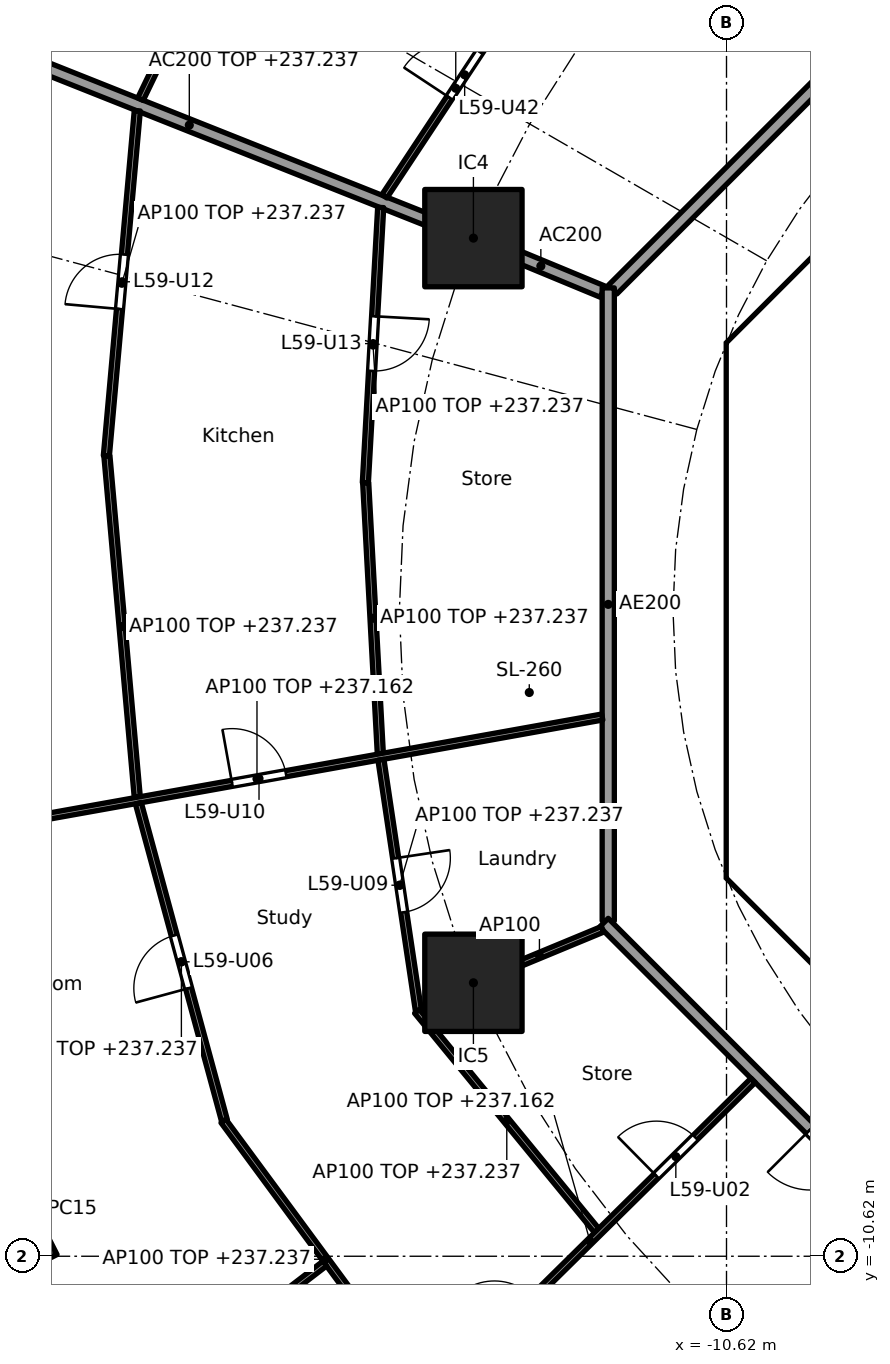
"""IFC4 building model, lengths in metres.
Left out: names, types, materials, properties, quantities, classifications, styles, units other than length and angle.
Written with IfcOpenShell. Run it as: python <this file> out.ifc"""

import sys

from ifc_helpers import new_model, si_unit, direction, frame, frame_2d, origin, origin_2d, place, context, subcontext, project, spatial, polyline, rectangle, hollow_rectangle, outline, extrude, element, fill, save


model = new_model("IFC4")
c1 = context("Model", 3, precision=1e-05, world=origin(), true_north=direction((0.0, 1.0)))
c2 = subcontext(c1, "Body", "Model", "MODEL_VIEW")
j1 = project(units=[si_unit("LENGTHUNIT", "METRE"), si_unit("PLANEANGLEUNIT", "RADIAN")], contexts=[c1])
p1 = place(None, origin())
s1 = spatial("IfcSite", under=j1, at=p1, CompositionType="ELEMENT")
p2 = place(p1, origin())
s2 = spatial("IfcBuilding", under=s1, at=p2, CompositionType="ELEMENT")
p3 = place(p2, frame((0.0, 0.0, 234.4)))
s3 = spatial("IfcBuildingStorey", under=s2, at=p3, CompositionType="ELEMENT", Elevation=234.4)
p4 = place(p3, frame((-22.212, -10.327, 0.0), z_axis=(0.0, 0.0, 1.0), x_axis=(0.452462697578, -0.891783329795, 0.0)))
e1 = element("IfcColumn", 1, at=p4, inside=s3, PredefinedType="COLUMN", context=c2, shape_type="SweptSolid", body=[
    extrude(hollow_rectangle(XDim=1.0, YDim=0.8, WallThickness=0.032, at=origin_2d()), origin(), (0.0, 0.0, 1.0), 3.7),
])
for number, where, z_axis, x_axis in (
    (2, (-14.782, 6.123, 0.0), (0.0, 0.0, 1.0), (1.0, 0.0, 0.0)),
    (3, (-14.782, -6.123, 0.0), (0.0, 0.0, 1.0), (1.0, 0.0, 0.0)),
):
    element("IfcColumn", number, at=place(p3, frame(where, z_axis=z_axis, x_axis=x_axis)), inside=s3, PredefinedType="COLUMN", context=c2, shape_type="SweptSolid", body=[
        extrude(rectangle(XDim=1.6, YDim=1.6, at=origin_2d()), origin(), (0.0, 0.0, 1.0), 3.7),
    ])
p5 = place(p3, frame((-20.788, -13.493, 0.0), z_axis=(0.0, 0.0, 1.0), x_axis=(-0.506294090973, 0.862360883532, 0.0)))
e4 = element("IfcWall", 4, at=p5, inside=s3, PredefinedType="SOLIDWALL", context=c2, shape_type="SweptSolid", body=[
    extrude(rectangle(XDim=2.955, YDim=0.25, at=frame_2d((1.477, 0.0))), origin(), (0.0, 0.0, 1.0), 3.44),
])
p6 = place(p5, frame((0.427, 0.0, 0.0)))
e5 = element("IfcOpeningElement", 5, at=p6, cuts=e4, PredefinedType="OPENING", context=c2, shape_type="SweptSolid", body=[
    extrude(rectangle(XDim=2.1, YDim=2.4, at=frame_2d((1.05, 1.2))), frame((0.0, 0.135, 0.0), z_axis=(0.0, -1.0, 0.0), x_axis=(1.0, 0.0, 0.0)), (0.0, 0.0, 1.0), 0.27),
])
p7 = place(p3, frame((-4.613, 9.988, 0.0), z_axis=(0.0, 0.0, 1.0), x_axis=(-0.707106781187, -0.707106781187, 0.0)))
e6 = element("IfcWall", 6, at=p7, inside=s3, PredefinedType="SHEAR", context=c2, shape_type="SweptSolid", body=[
    extrude(rectangle(XDim=7.602, YDim=0.6, at=frame_2d((3.801, 0.0))), origin(), (0.0, 0.0, 1.0), 3.44),
])
p8 = place(p7, frame((0.351, 0.0, 0.0)))
e7 = element("IfcOpeningElement", 7, at=p8, cuts=e6, PredefinedType="OPENING", context=c2, shape_type="SweptSolid", body=[
    extrude(rectangle(XDim=1.1, YDim=2.1, at=frame_2d((0.55, 1.05))), frame((0.0, 0.31, 0.0), z_axis=(0.0, -1.0, 0.0), x_axis=(1.0, 0.0, 0.0)), (0.0, 0.0, 1.0), 0.62),
])
p9 = place(p3, frame((-10.325, 3.801, 0.0), z_axis=(0.0, 0.0, 1.0), x_axis=(0.0, -1.0, 0.0)))
e8 = element("IfcWall", 8, at=p9, inside=s3, PredefinedType="SHEAR", context=c2, shape_type="SweptSolid", body=[
    extrude(rectangle(XDim=7.602, YDim=0.6, at=frame_2d((3.801, 0.0))), origin(), (0.0, 0.0, 1.0), 3.44),
])
p10 = place(p9, frame((0.651, 0.0, 0.0)))
e9 = element("IfcOpeningElement", 9, at=p10, cuts=e8, PredefinedType="OPENING", context=c2, shape_type="SweptSolid", body=[
    extrude(rectangle(XDim=1.5, YDim=2.1, at=frame_2d((0.75, 1.05))), frame((0.0, 0.31, 0.0), z_axis=(0.0, -1.0, 0.0), x_axis=(1.0, 0.0, 0.0)), (0.0, 0.0, 1.0), 0.62),
])
p11 = place(p9, frame((5.451, 0.0, 0.0)))
e10 = element("IfcOpeningElement", 10, at=p11, cuts=e8, PredefinedType="OPENING", context=c2, shape_type="SweptSolid", body=[
    extrude(rectangle(XDim=1.5, YDim=2.1, at=frame_2d((0.75, 1.05))), frame((0.0, 0.31, 0.0), z_axis=(0.0, -1.0, 0.0), x_axis=(1.0, 0.0, 0.0)), (0.0, 0.0, 1.0), 0.62),
])
p12 = place(p3, frame((-9.988, -4.613, 0.0), z_axis=(0.0, 0.0, 1.0), x_axis=(0.707106781187, -0.707106781187, 0.0)))
e11 = element("IfcWall", 11, at=p12, inside=s3, PredefinedType="SHEAR", context=c2, shape_type="SweptSolid", body=[
    extrude(rectangle(XDim=7.602, YDim=0.6, at=frame_2d((3.801, 0.0))), origin(), (0.0, 0.0, 1.0), 3.44),
])
p13 = place(p12, frame((6.151, 0.0, 0.0)))
e12 = element("IfcOpeningElement", 12, at=p13, cuts=e11, PredefinedType="OPENING", context=c2, shape_type="SweptSolid", body=[
    extrude(rectangle(XDim=1.1, YDim=2.1, at=frame_2d((0.55, 1.05))), frame((0.0, 0.31, 0.0), z_axis=(0.0, -1.0, 0.0), x_axis=(1.0, 0.0, 0.0)), (0.0, 0.0, 1.0), 0.62),
])
p14 = place(p3, origin())
e13 = element("IfcWall", 13, at=p14, inside=s3, PredefinedType="SHEAR", context=c2, shape_type="SweptSolid", body=[
    extrude(outline(polyline([(-10.625, -3.801), (-10.025, -3.801), (-10.025, -4.152), (-9.776, -4.401), (-10.2, -4.825), (-10.625, -4.401), (-10.625, -3.801)])), origin(), (0.0, 0.0, 1.0), 3.44),
])
p15 = place(p3, origin())
e14 = element("IfcWall", 14, at=p15, inside=s3, PredefinedType="SHEAR", context=c2, shape_type="SweptSolid", body=[
    extrude(outline(polyline([(-10.2, 4.825), (-9.776, 4.401), (-10.025, 4.152), (-10.025, 3.801), (-10.625, 3.801), (-10.625, 4.401), (-10.2, 4.825)])), origin(), (0.0, 0.0, 1.0), 3.44),
])
for number, where, z_axis, x_axis in (
    (15, (-10.025, -4.0, 0.0), (0.0, 0.0, 1.0), (1.0, 0.0, 0.0)),
    (16, (-10.025, 4.0, 0.0), (0.0, 0.0, 1.0), (1.0, 0.0, 0.0)),
):
    element("IfcWall", number, at=place(p3, frame(where, z_axis=z_axis, x_axis=x_axis)), inside=s3, PredefinedType="PARTITIONING", context=c2, shape_type="SweptSolid", body=[
        extrude(rectangle(XDim=3.325, YDim=0.2, at=frame_2d((1.662, 0.0))), origin(), (0.0, 0.0, 1.0), 3.44),
    ])
p16 = place(p3, frame((-12.657, 5.243, 0.0), z_axis=(0.0, 0.0, 1.0), x_axis=(-0.923859888513, 0.38273085373, 0.0)))
e17 = element("IfcWall", 17, at=p16, inside=s3, PredefinedType="PARTITIONING", context=c2, shape_type="SweptSolid", body=[
    extrude(rectangle(XDim=2.199, YDim=0.2, at=frame_2d((1.1, 0.0))), origin(), (0.0, 0.0, 1.0), 3.44),
])
p17 = place(p3, frame((-14.829, 6.141, 0.0), z_axis=(0.0, 0.0, 1.0), x_axis=(-0.929202069098, 0.36957206981, 0.0)))
e18 = element("IfcWall", 18, at=p17, inside=s3, PredefinedType="PARTITIONING", context=c2, shape_type="SweptSolid", body=[
    extrude(rectangle(XDim=9.957, YDim=0.2, at=frame_2d((4.978, 0.0))), origin(), (0.0, 0.0, 1.0), 2.837),
])
p18 = place(p3, frame((-5.275, 12.494, 0.0), z_axis=(0.0, 0.0, 1.0), x_axis=(-0.707106781187, -0.707106781187, 0.0)))
e19 = element("IfcWall", 19, at=p18, inside=s3, PredefinedType="PARTITIONING", context=c2, shape_type="SweptSolid", body=[
    extrude(rectangle(XDim=10.209, YDim=0.2, at=frame_2d((5.104, 0.0))), origin(), (0.0, 0.0, 1.0), 3.44),
])
p19 = place(p18, frame((1.185, 0.0, 0.0)))
e20 = element("IfcOpeningElement", 20, at=p19, cuts=e19, PredefinedType="OPENING", context=c2, shape_type="SweptSolid", body=[
    extrude(rectangle(XDim=1.0, YDim=2.1, at=frame_2d((0.5, 1.05))), frame((0.0, 0.11, 0.0), z_axis=(0.0, -1.0, 0.0), x_axis=(1.0, 0.0, 0.0)), (0.0, 0.0, 1.0), 0.22),
])
p20 = place(p3, frame((-12.565, 5.304, 0.0), z_axis=(0.0, 0.0, 1.0), x_axis=(0.0, -1.0, 0.0)))
e21 = element("IfcWall", 21, at=p20, inside=s3, PredefinedType="PARTITIONING", context=c2, shape_type="SweptSolid", body=[
    extrude(rectangle(XDim=10.409, YDim=0.2, at=frame_2d((5.205, 0.0))), origin(), (0.0, 0.0, 1.0), 3.44),
])
p21 = place(p3, frame((-12.635, -5.134, 0.0), z_axis=(0.0, 0.0, 1.0), x_axis=(0.707106781187, -0.707106781187, 0.0)))
e22 = element("IfcWall", 22, at=p21, inside=s3, PredefinedType="PARTITIONING", context=c2, shape_type="SweptSolid", body=[
    extrude(rectangle(XDim=10.609, YDim=0.2, at=frame_2d((5.305, 0.0))), origin(), (0.0, 0.0, 1.0), 3.44),
])
p22 = place(p21, frame((4.804, 0.0, 0.0)))
e23 = element("IfcOpeningElement", 23, at=p22, cuts=e22, PredefinedType="OPENING", context=c2, shape_type="SweptSolid", body=[
    extrude(rectangle(XDim=1.0, YDim=2.1, at=frame_2d((0.5, 1.05))), frame((0.0, 0.11, 0.0), z_axis=(0.0, -1.0, 0.0), x_axis=(1.0, 0.0, 0.0)), (0.0, 0.0, 1.0), 0.22),
])
p23 = place(p3, frame((-13.899, 10.363, 0.0), z_axis=(0.0, 0.0, 1.0), x_axis=(-0.551267958114, -0.834328255758, 0.0)))
e24 = element("IfcWall", 24, at=p23, inside=s3, PredefinedType="PARTITIONING", context=c2, shape_type="SweptSolid", body=[
    extrude(rectangle(XDim=4.257, YDim=0.1, at=frame_2d((2.129, 0.0))), origin(), (0.0, 0.0, 1.0), 2.837),
])
p24 = place(p23, frame((1.413, 0.0, 0.0)))
e25 = element("IfcOpeningElement", 25, at=p24, cuts=e24, PredefinedType="OPENING", context=c2, shape_type="SweptSolid", body=[
    extrude(rectangle(XDim=0.9, YDim=2.1, at=frame_2d((0.45, 1.05))), frame((0.0, 0.06, 0.0), z_axis=(0.0, -1.0, 0.0), x_axis=(1.0, 0.0, 0.0)), (0.0, 0.0, 1.0), 0.12),
])
p25 = place(p3, frame((-17.904, 13.289, 0.0), z_axis=(0.0, 0.0, 1.0), x_axis=(-0.43429918566, -0.900768681369, 0.0)))
e26 = element("IfcWall", 26, at=p25, inside=s3, PredefinedType="PARTITIONING", context=c2, shape_type="SweptSolid", body=[
    extrude(rectangle(XDim=5.418, YDim=0.1, at=frame_2d((2.709, 0.0))), origin(), (0.0, 0.0, 1.0), 2.837),
])
p26 = place(p3, frame((-16.307, 6.627, 0.0), z_axis=(0.0, 0.0, 1.0), x_axis=(-0.055616130958, -0.998452225185, 0.0)))
e27 = element("IfcWall", 27, at=p26, inside=s3, PredefinedType="PARTITIONING", context=c2, shape_type="SweptSolid", body=[
    extrude(rectangle(XDim=4.535, YDim=0.1, at=frame_2d((2.267, 0.0))), origin(), (0.0, 0.0, 1.0), 2.837),
])
p27 = place(p26, frame((1.792, 0.0, 0.0)))
e28 = element("IfcOpeningElement", 28, at=p27, cuts=e27, PredefinedType="OPENING", context=c2, shape_type="SweptSolid", body=[
    extrude(rectangle(XDim=0.9, YDim=2.1, at=frame_2d((0.45, 1.05))), frame((0.0, 0.06, 0.0), z_axis=(0.0, -1.0, 0.0), x_axis=(1.0, 0.0, 0.0)), (0.0, 0.0, 1.0), 0.12),
])
p28 = place(p3, frame((-20.31, 8.218, 0.0), z_axis=(0.0, 0.0, 1.0), x_axis=(-0.089284106956, -0.996006198899, 0.0)))
e29 = element("IfcWall", 29, at=p28, inside=s3, PredefinedType="PARTITIONING", context=c2, shape_type="SweptSolid", body=[
    extrude(rectangle(XDim=5.698, YDim=0.1, at=frame_2d((2.849, 0.0))), origin(), (0.0, 0.0, 1.0), 2.837),
])
p29 = place(p28, frame((2.374, 0.0, 0.0)))
e30 = element("IfcOpeningElement", 30, at=p29, cuts=e29, PredefinedType="OPENING", context=c2, shape_type="SweptSolid", body=[
    extrude(rectangle(XDim=0.9, YDim=2.1, at=frame_2d((0.45, 1.05))), frame((0.0, 0.06, 0.0), z_axis=(0.0, -1.0, 0.0), x_axis=(1.0, 0.0, 0.0)), (0.0, 0.0, 1.0), 0.12),
])
p30 = place(p3, frame((-16.554, 2.1, 0.0), z_axis=(0.0, 0.0, 1.0), x_axis=(0.053945770239, -0.998543866775, 0.0)))
e31 = element("IfcWall", 31, at=p30, inside=s3, PredefinedType="PARTITIONING", context=c2, shape_type="SweptSolid", body=[
    extrude(rectangle(XDim=4.462, YDim=0.1, at=frame_2d((2.231, 0.0))), origin(), (0.0, 0.0, 1.0), 2.837),
])
p31 = place(p3, frame((-20.81, 2.542, 0.0), z_axis=(0.0, 0.0, 1.0), x_axis=(0.088621920298, -0.996065336834, 0.0)))
e32 = element("IfcWall", 32, at=p31, inside=s3, PredefinedType="PARTITIONING", context=c2, shape_type="SweptSolid", body=[
    extrude(rectangle(XDim=5.636, YDim=0.1, at=frame_2d((2.818, 0.0))), origin(), (0.0, 0.0, 1.0), 2.837),
])
p32 = place(p3, frame((-12.663, -1.752, 0.0), z_axis=(0.0, 0.0, 1.0), x_axis=(-0.98433012022, -0.176335516635, 0.0)))
e33 = element("IfcWall", 33, at=p32, inside=s3, PredefinedType="PARTITIONING", context=c2, shape_type="SweptSolid", body=[
    extrude(rectangle(XDim=11.537, YDim=0.1, at=frame_2d((5.769, 0.0))), origin(), (0.0, 0.0, 1.0), 2.762),
])
p33 = place(p32, frame((5.285, 0.0, 0.0)))
e34 = element("IfcOpeningElement", 34, at=p33, cuts=e33, PredefinedType="OPENING", context=c2, shape_type="SweptSolid", body=[
    extrude(rectangle(XDim=0.9, YDim=2.1, at=frame_2d((0.45, 1.05))), frame((0.0, 0.06, 0.0), z_axis=(0.0, -1.0, 0.0), x_axis=(1.0, 0.0, 0.0)), (0.0, 0.0, 1.0), 0.12),
])
p34 = place(p3, frame((-16.303, -2.455, 0.0), z_axis=(0.0, 0.0, 1.0), x_axis=(0.14769374353, -0.989033143086, 0.0)))
e35 = element("IfcWall", 35, at=p34, inside=s3, PredefinedType="PARTITIONING", context=c2, shape_type="SweptSolid", body=[
    extrude(rectangle(XDim=4.172, YDim=0.1, at=frame_2d((2.086, 0.0))), origin(), (0.0, 0.0, 1.0), 2.837),
])
p35 = place(p34, frame((1.636, 0.0, 0.0)))
e36 = element("IfcOpeningElement", 36, at=p35, cuts=e35, PredefinedType="OPENING", context=c2, shape_type="SweptSolid", body=[
    extrude(rectangle(XDim=0.9, YDim=2.1, at=frame_2d((0.45, 1.05))), frame((0.0, 0.06, 0.0), z_axis=(0.0, -1.0, 0.0), x_axis=(1.0, 0.0, 0.0)), (0.0, 0.0, 1.0), 0.12),
])
p36 = place(p3, frame((-20.292, -3.17, 0.0), z_axis=(0.0, 0.0, 1.0), x_axis=(0.261890541964, -0.965097582646, 0.0)))
e37 = element("IfcWall", 37, at=p36, inside=s3, PredefinedType="PARTITIONING", context=c2, shape_type="SweptSolid", body=[
    extrude(rectangle(XDim=5.406, YDim=0.1, at=frame_2d((2.703, 0.0))), origin(), (0.0, 0.0, 1.0), 2.837),
])
p37 = place(p36, frame((2.253, 0.0, 0.0)))
e38 = element("IfcOpeningElement", 38, at=p37, cuts=e37, PredefinedType="OPENING", context=c2, shape_type="SweptSolid", body=[
    extrude(rectangle(XDim=0.9, YDim=2.1, at=frame_2d((0.45, 1.05))), frame((0.0, 0.06, 0.0), z_axis=(0.0, -1.0, 0.0), x_axis=(1.0, 0.0, 0.0)), (0.0, 0.0, 1.0), 0.12),
])
p38 = place(p3, frame((-12.657, -5.243, 0.0), z_axis=(0.0, 0.0, 1.0), x_axis=(-0.923864733477, -0.382719158442, 0.0)))
e39 = element("IfcWall", 39, at=p38, inside=s3, PredefinedType="PARTITIONING", context=c2, shape_type="SweptSolid", body=[
    extrude(rectangle(XDim=2.25, YDim=0.1, at=frame_2d((1.125, 0.0))), origin(), (0.0, 0.0, 1.0), 3.44),
])
p39 = place(p3, frame((-15.711, -6.593, 0.0), z_axis=(0.0, 0.0, 1.0), x_axis=(0.634058916642, -0.773284740718, 0.0)))
e40 = element("IfcWall", 40, at=p39, inside=s3, PredefinedType="PARTITIONING", context=c2, shape_type="SweptSolid", body=[
    extrude(rectangle(XDim=4.661, YDim=0.1, at=frame_2d((2.331, 0.0))), origin(), (0.0, 0.0, 1.0), 2.837),
])
p40 = place(p3, frame((-18.893, -8.395, 0.0), z_axis=(0.0, 0.0, 1.0), x_axis=(0.593212299255, -0.80504606577, 0.0)))
e41 = element("IfcWall", 41, at=p40, inside=s3, PredefinedType="PARTITIONING", context=c2, shape_type="SweptSolid", body=[
    extrude(rectangle(XDim=5.652, YDim=0.1, at=frame_2d((2.826, 0.0))), origin(), (0.0, 0.0, 1.0), 2.837),
])
p41 = place(p3, frame((-17.227, -10.74, 0.0), z_axis=(0.0, 0.0, 1.0), x_axis=(-0.793312316411, -0.60881488864, 0.0)))
e42 = element("IfcWall", 42, at=p41, inside=s3, PredefinedType="PARTITIONING", context=c2, shape_type="SweptSolid", body=[
    extrude(rectangle(XDim=4.585, YDim=0.1, at=frame_2d((2.292, 0.0))), origin(), (0.0, 0.0, 1.0), 2.983),
])
p42 = place(p3, frame((-10.183, -7.728, 0.0), z_axis=(0.0, 0.0, 1.0), x_axis=(-0.711869910979, -0.702311348223, 0.0)))
e43 = element("IfcWall", 43, at=p42, inside=s3, PredefinedType="PARTITIONING", context=c2, shape_type="SweptSolid", body=[
    extrude(rectangle(XDim=7.535, YDim=0.1, at=frame_2d((3.767, 0.0))), origin(), (0.0, 0.0, 1.0), 2.762),
])
p43 = place(p42, frame((1.335, 0.0, 0.0)))
e44 = element("IfcOpeningElement", 44, at=p43, cuts=e43, PredefinedType="OPENING", context=c2, shape_type="SweptSolid", body=[
    extrude(rectangle(XDim=0.9, YDim=2.1, at=frame_2d((0.45, 1.05))), frame((0.0, 0.06, 0.0), z_axis=(0.0, -1.0, 0.0), x_axis=(1.0, 0.0, 0.0)), (0.0, 0.0, 1.0), 0.12),
])
p44 = place(p42, frame((5.077, 0.0, 0.0)))
e45 = element("IfcOpeningElement", 45, at=p44, cuts=e43, PredefinedType="OPENING", context=c2, shape_type="SweptSolid", body=[
    extrude(rectangle(XDim=0.9, YDim=2.1, at=frame_2d((0.45, 1.05))), frame((0.0, 0.06, 0.0), z_axis=(0.0, -1.0, 0.0), x_axis=(1.0, 0.0, 0.0)), (0.0, 0.0, 1.0), 0.12),
])
p45 = place(p3, frame((-7.709, -10.198, 0.0), z_axis=(0.0, 0.0, 1.0), x_axis=(-0.507355901053, -0.8617366127, 0.0)))
e46 = element("IfcWall", 46, at=p45, inside=s3, PredefinedType="PARTITIONING", context=c2, shape_type="SweptSolid", body=[
    extrude(rectangle(XDim=11.025, YDim=0.1, at=frame_2d((5.512, 0.0))), origin(), (0.0, 0.0, 1.0), 2.762),
])
p46 = place(p45, frame((1.326, 0.0, 0.0)))
e47 = element("IfcOpeningElement", 47, at=p46, cuts=e46, PredefinedType="OPENING", context=c2, shape_type="SweptSolid", body=[
    extrude(rectangle(XDim=0.9, YDim=2.1, at=frame_2d((0.45, 1.05))), frame((0.0, 0.06, 0.0), z_axis=(0.0, -1.0, 0.0), x_axis=(1.0, 0.0, 0.0)), (0.0, 0.0, 1.0), 0.12),
])
p47 = place(p45, frame((5.05, 0.0, 0.0)))
e48 = element("IfcOpeningElement", 48, at=p47, cuts=e46, PredefinedType="OPENING", context=c2, shape_type="SweptSolid", body=[
    extrude(rectangle(XDim=0.9, YDim=2.1, at=frame_2d((0.45, 1.05))), frame((0.0, 0.06, 0.0), z_axis=(0.0, -1.0, 0.0), x_axis=(1.0, 0.0, 0.0)), (0.0, 0.0, 1.0), 0.12),
])
p48 = place(p45, frame((8.787, 0.0, 0.0)))
e49 = element("IfcOpeningElement", 49, at=p48, cuts=e46, PredefinedType="OPENING", context=c2, shape_type="SweptSolid", body=[
    extrude(rectangle(XDim=0.9, YDim=2.1, at=frame_2d((0.45, 1.05))), frame((0.0, 0.06, 0.0), z_axis=(0.0, -1.0, 0.0), x_axis=(1.0, 0.0, 0.0)), (0.0, 0.0, 1.0), 0.12),
])
p49 = place(p10, origin())
e50 = element("IfcDoor", 50, at=p49, inside=s3, OperationType="DOUBLE_DOOR_SINGLE_SWING", PredefinedType="DOOR", context=c2, shape_type="SweptSolid", body=[
    extrude(rectangle(XDim=1.5, YDim=2.1, at=frame_2d((0.75, 1.05))), frame((0.0, 0.025, 0.0), z_axis=(0.0, -1.0, 0.0), x_axis=(1.0, 0.0, 0.0)), (0.0, 0.0, 1.0), 0.05),
])
fill(e9, e50)
p50 = place(p11, origin())
e51 = element("IfcDoor", 51, at=p50, inside=s3, OperationType="DOUBLE_DOOR_SINGLE_SWING", PredefinedType="DOOR", context=c2, shape_type="SweptSolid", body=[
    extrude(rectangle(XDim=1.5, YDim=2.1, at=frame_2d((0.75, 1.05))), frame((0.0, 0.025, 0.0), z_axis=(0.0, -1.0, 0.0), x_axis=(1.0, 0.0, 0.0)), (0.0, 0.0, 1.0), 0.05),
])
fill(e10, e51)
p51 = place(p22, frame((1.0, 0.0, 0.0), x_axis=(-1.0, 0.0, 0.0)))
e52 = element("IfcDoor", 52, at=p51, inside=s3, OperationType="SINGLE_SWING_RIGHT", PredefinedType="DOOR", context=c2, shape_type="SweptSolid", body=[
    extrude(rectangle(XDim=1.0, YDim=2.1, at=frame_2d((0.5, 1.05))), frame((0.0, 0.025, 0.0), z_axis=(0.0, -1.0, 0.0), x_axis=(1.0, 0.0, 0.0)), (0.0, 0.0, 1.0), 0.05),
])
fill(e23, e52)
p52 = place(p43, frame((0.9, 0.0, 0.0), x_axis=(-1.0, 0.0, 0.0)))
e53 = element("IfcDoor", 53, at=p52, inside=s3, OperationType="SINGLE_SWING_LEFT", PredefinedType="DOOR", context=c2, shape_type="SweptSolid", body=[
    extrude(rectangle(XDim=0.9, YDim=2.1, at=frame_2d((0.45, 1.05))), frame((0.0, 0.025, 0.0), z_axis=(0.0, -1.0, 0.0), x_axis=(1.0, 0.0, 0.0)), (0.0, 0.0, 1.0), 0.05),
])
fill(e44, e53)
p53 = place(p37, frame((0.9, 0.0, 0.0), x_axis=(-1.0, 0.0, 0.0)))
e54 = element("IfcDoor", 54, at=p53, inside=s3, OperationType="SINGLE_SWING_LEFT", PredefinedType="DOOR", context=c2, shape_type="SweptSolid", body=[
    extrude(rectangle(XDim=0.9, YDim=2.1, at=frame_2d((0.45, 1.05))), frame((0.0, 0.025, 0.0), z_axis=(0.0, -1.0, 0.0), x_axis=(1.0, 0.0, 0.0)), (0.0, 0.0, 1.0), 0.05),
])
fill(e38, e54)
p54 = place(p35, origin())
e55 = element("IfcDoor", 55, at=p54, inside=s3, OperationType="SINGLE_SWING_LEFT", PredefinedType="DOOR", context=c2, shape_type="SweptSolid", body=[
    extrude(rectangle(XDim=0.9, YDim=2.1, at=frame_2d((0.45, 1.05))), frame((0.0, 0.025, 0.0), z_axis=(0.0, -1.0, 0.0), x_axis=(1.0, 0.0, 0.0)), (0.0, 0.0, 1.0), 0.05),
])
fill(e36, e55)
p55 = place(p33, frame((0.9, 0.0, 0.0), x_axis=(-1.0, 0.0, 0.0)))
e56 = element("IfcDoor", 56, at=p55, inside=s3, OperationType="SINGLE_SWING_LEFT", PredefinedType="DOOR", context=c2, shape_type="SweptSolid", body=[
    extrude(rectangle(XDim=0.9, YDim=2.1, at=frame_2d((0.45, 1.05))), frame((0.0, 0.025, 0.0), z_axis=(0.0, -1.0, 0.0), x_axis=(1.0, 0.0, 0.0)), (0.0, 0.0, 1.0), 0.05),
])
fill(e34, e56)
p56 = place(p29, frame((0.9, 0.0, 0.0), x_axis=(-1.0, 0.0, 0.0)))
e57 = element("IfcDoor", 57, at=p56, inside=s3, OperationType="SINGLE_SWING_LEFT", PredefinedType="DOOR", context=c2, shape_type="SweptSolid", body=[
    extrude(rectangle(XDim=0.9, YDim=2.1, at=frame_2d((0.45, 1.05))), frame((0.0, 0.025, 0.0), z_axis=(0.0, -1.0, 0.0), x_axis=(1.0, 0.0, 0.0)), (0.0, 0.0, 1.0), 0.05),
])
fill(e30, e57)
p57 = place(p27, origin())
e58 = element("IfcDoor", 58, at=p57, inside=s3, OperationType="SINGLE_SWING_LEFT", PredefinedType="DOOR", context=c2, shape_type="SweptSolid", body=[
    extrude(rectangle(XDim=0.9, YDim=2.1, at=frame_2d((0.45, 1.05))), frame((0.0, 0.025, 0.0), z_axis=(0.0, -1.0, 0.0), x_axis=(1.0, 0.0, 0.0)), (0.0, 0.0, 1.0), 0.05),
])
fill(e28, e58)
p58 = place(p24, frame((0.9, 0.0, 0.0), x_axis=(-1.0, 0.0, 0.0)))
e59 = element("IfcDoor", 59, at=p58, inside=s3, OperationType="SINGLE_SWING_LEFT", PredefinedType="DOOR", context=c2, shape_type="SweptSolid", body=[
    extrude(rectangle(XDim=0.9, YDim=2.1, at=frame_2d((0.45, 1.05))), frame((0.0, 0.025, 0.0), z_axis=(0.0, -1.0, 0.0), x_axis=(1.0, 0.0, 0.0)), (0.0, 0.0, 1.0), 0.05),
])
fill(e25, e59)
save(model, sys.argv[1])
